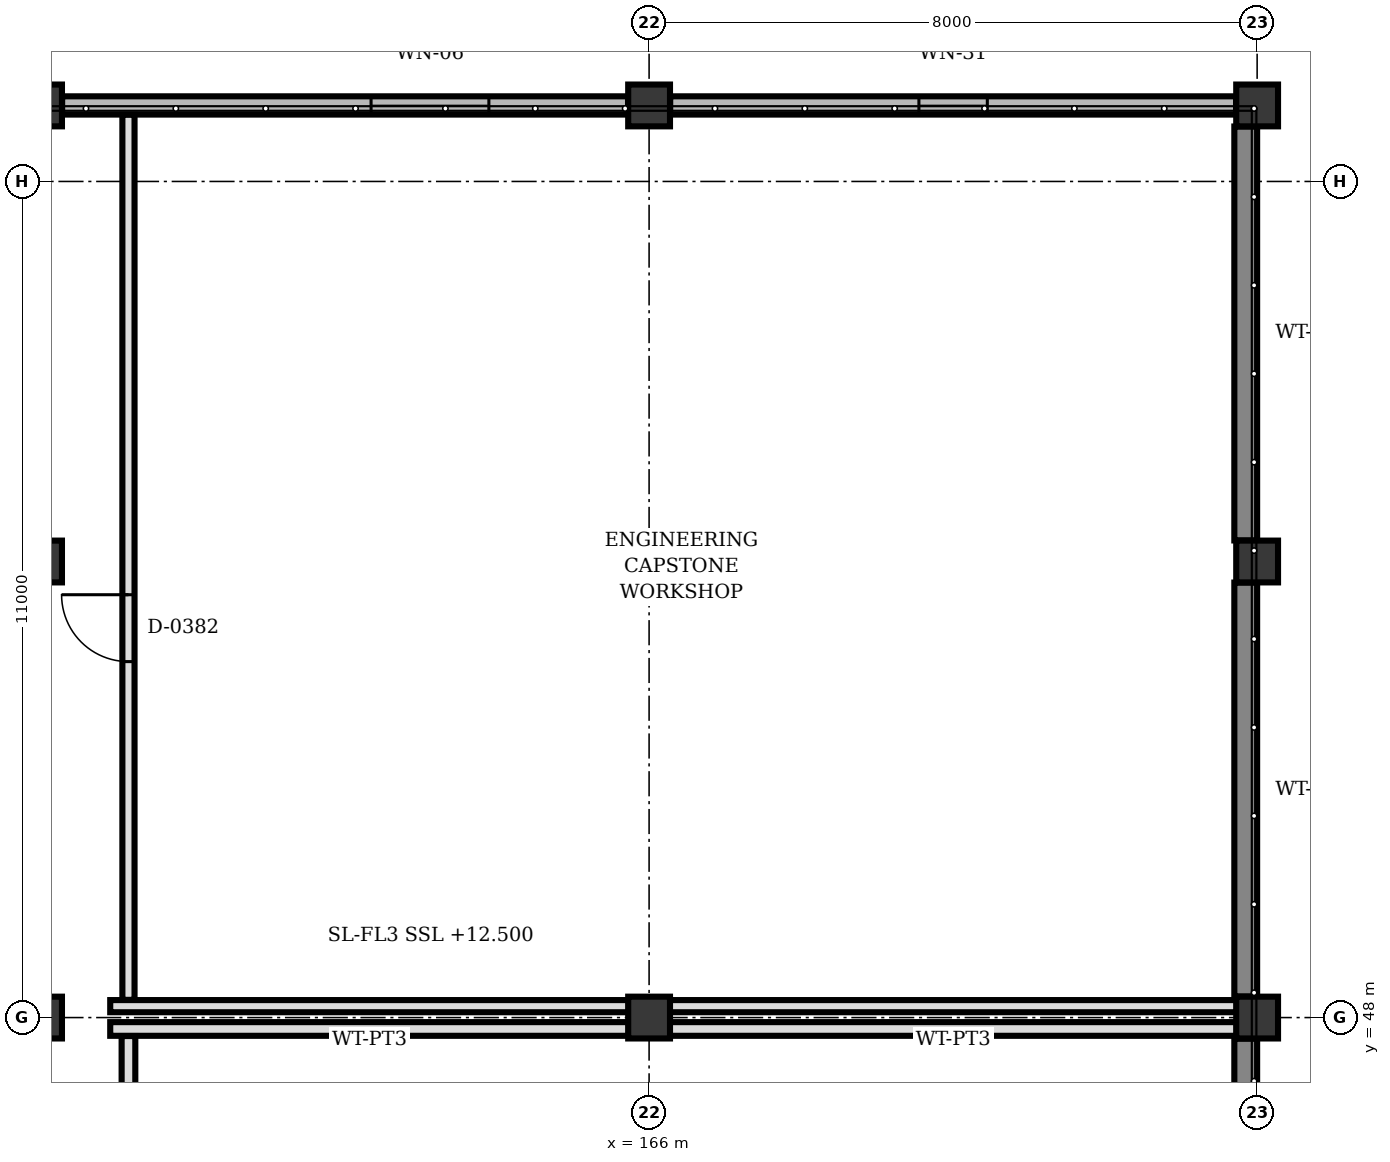
"""IFC4 building model, lengths in metres.
Left out: names, types, materials, properties, quantities, classifications, styles, units other than length and angle.
Written with IfcOpenShell. Run it as: python <this file> out.ifc"""

import sys

from ifc_helpers import new_model, si_unit, direction, frame, frame_2d, origin, origin_2d, place, context, subcontext, project, spatial, rectangle, extrude, element, fill, save


model = new_model("IFC4")
c1 = context("Model", 3, precision=1e-05, world=origin(), true_north=direction((0.0, 1.0)))
c2 = subcontext(c1, "Body", "Model", "MODEL_VIEW")
j1 = project(units=[si_unit("LENGTHUNIT", "METRE"), si_unit("PLANEANGLEUNIT", "RADIAN")], contexts=[c1])
p1 = place(None, origin())
s1 = spatial("IfcSite", under=j1, at=p1, CompositionType="ELEMENT")
p2 = place(p1, origin())
s2 = spatial("IfcBuilding", under=s1, at=p2, CompositionType="ELEMENT")
p3 = place(p2, frame((0.0, 0.0, 12.5)))
s3 = spatial("IfcBuildingStorey", under=s2, at=p3, CompositionType="ELEMENT", Elevation=12.5)
for number, where, z_axis, x_axis in (
    (1, (158.0, 48.0, 0.0), (0.0, 0.0, 1.0), (1.0, 0.0, 0.0)),
    (2, (158.0, 54.0, 0.0), (0.0, 0.0, 1.0), (1.0, 0.0, 0.0)),
    (3, (158.0, 60.0, 0.0), (0.0, 0.0, 1.0), (1.0, 0.0, 0.0)),
    (4, (166.0, 48.0, 0.0), (0.0, 0.0, 1.0), (1.0, 0.0, 0.0)),
    (5, (166.0, 54.0, 0.0), (0.0, 0.0, 1.0), (1.0, 0.0, 0.0)),
    (6, (166.0, 60.0, 0.0), (0.0, 0.0, 1.0), (1.0, 0.0, 0.0)),
    (7, (174.0, 48.0, 0.0), (0.0, 0.0, 1.0), (1.0, 0.0, 0.0)),
    (8, (174.0, 54.0, 0.0), (0.0, 0.0, 1.0), (1.0, 0.0, 0.0)),
    (9, (174.0, 60.0, 0.0), (0.0, 0.0, 1.0), (1.0, 0.0, 0.0)),
):
    element("IfcColumn", number, at=place(p3, frame(where, z_axis=z_axis, x_axis=x_axis)), inside=s3, PredefinedType="COLUMN", context=c2, shape_type="SweptSolid", body=[
        extrude(rectangle(XDim=0.55, YDim=0.55, at=origin_2d()), origin(), (0.0, 0.0, 1.0), 4.0),
    ])
p4 = place(p3, frame((158.277, 60.0, 0.0), z_axis=(0.0, 0.0, 1.0), x_axis=(1.0, 0.0, 0.0)))
e10 = element("IfcWall", 10, at=p4, inside=s3, PredefinedType="SOLIDWALL", context=c2, shape_type="SweptSolid", body=[
    extrude(rectangle(XDim=7.446, YDim=0.24, at=frame_2d((3.723, 0.0))), origin(), (0.0, 0.0, 1.0), 3.289),
])
p5 = place(p4, frame((4.065, 0.0, 0.9)))
e11 = element("IfcOpeningElement", 11, at=p5, cuts=e10, PredefinedType="OPENING", context=c2, shape_type="SweptSolid", body=[
    extrude(rectangle(XDim=1.55, YDim=1.1, at=frame_2d((0.775, 0.55))), frame((0.0, 0.13, 0.0), z_axis=(0.0, -1.0, 0.0), x_axis=(1.0, 0.0, 0.0)), (0.0, 0.0, 1.0), 0.26),
])
p6 = place(p3, frame((166.277, 60.0, 0.0), z_axis=(0.0, 0.0, 1.0), x_axis=(1.0, 0.0, 0.0)))
e12 = element("IfcWall", 12, at=p6, inside=s3, PredefinedType="SOLIDWALL", context=c2, shape_type="SweptSolid", body=[
    extrude(rectangle(XDim=7.446, YDim=0.24, at=frame_2d((3.723, 0.0))), origin(), (0.0, 0.0, 1.0), 3.289),
])
p7 = place(p6, frame((3.273, 0.0, 0.9)))
e13 = element("IfcOpeningElement", 13, at=p7, cuts=e12, PredefinedType="OPENING", context=c2, shape_type="SweptSolid", body=[
    extrude(rectangle(XDim=0.9, YDim=1.55, at=frame_2d((0.45, 0.775))), frame((0.0, 0.13, 0.0), z_axis=(0.0, -1.0, 0.0), x_axis=(1.0, 0.0, 0.0)), (0.0, 0.0, 1.0), 0.26),
])
p8 = place(p3, frame((173.85, 59.723, 0.0), z_axis=(0.0, 0.0, 1.0), x_axis=(0.0, -1.0, 0.0)))
e14 = element("IfcWall", 14, at=p8, inside=s3, PredefinedType="SHEAR", context=c2, shape_type="SweptSolid", body=[
    extrude(rectangle(XDim=5.446, YDim=0.3, at=frame_2d((2.723, 0.0))), origin(), (0.0, 0.0, 1.0), 3.494),
])
p9 = place(p3, frame((173.85, 53.723, 0.0), z_axis=(0.0, 0.0, 1.0), x_axis=(0.0, -1.0, 0.0)))
e15 = element("IfcWall", 15, at=p9, inside=s3, PredefinedType="SHEAR", context=c2, shape_type="SweptSolid", body=[
    extrude(rectangle(XDim=5.446, YDim=0.3, at=frame_2d((2.723, 0.0))), origin(), (0.0, 0.0, 1.0), 3.442),
])
p10 = place(p3, frame((173.85, 47.723, 0.0), z_axis=(0.0, 0.0, 1.0), x_axis=(0.0, -1.0, 0.0)))
e16 = element("IfcWall", 16, at=p10, inside=s3, PredefinedType="SHEAR", context=c2, shape_type="SweptSolid", body=[
    extrude(rectangle(XDim=7.446, YDim=0.3, at=frame_2d((3.723, 0.0))), origin(), (0.0, 0.0, 1.0), 3.494),
])
p11 = place(p3, frame((158.91, 47.85, 0.0), z_axis=(0.0, 0.0, 1.0), x_axis=(1.0, 0.0, 0.0)))
e17 = element("IfcWall", 17, at=p11, inside=s3, PredefinedType="PARTITIONING", context=c2, shape_type="SweptSolid", body=[
    extrude(rectangle(XDim=6.823, YDim=0.18, at=frame_2d((3.412, 0.0))), origin(), (0.0, 0.0, 1.0), 3.289),
])
p12 = place(p3, frame((166.267, 47.85, 0.0), z_axis=(0.0, 0.0, 1.0), x_axis=(1.0, 0.0, 0.0)))
e18 = element("IfcWall", 18, at=p12, inside=s3, PredefinedType="PARTITIONING", context=c2, shape_type="SweptSolid", body=[
    extrude(rectangle(XDim=7.466, YDim=0.18, at=frame_2d((3.733, 0.0))), origin(), (0.0, 0.0, 1.0), 3.289),
])
p13 = place(p3, frame((159.15, 32.123, 0.0), z_axis=(0.0, 0.0, 1.0), x_axis=(0.0, 1.0, 0.0)))
e19 = element("IfcWall", 19, at=p13, inside=s3, PredefinedType="PARTITIONING", context=c2, shape_type="SweptSolid", body=[
    extrude(rectangle(XDim=15.634, YDim=0.18, at=frame_2d((7.817, 0.0))), origin(), (0.0, 0.0, 1.0), 3.289),
])
p14 = place(p13, frame((6.126, 0.0, 0.0)))
e20 = element("IfcOpeningElement", 20, at=p14, cuts=e19, PredefinedType="OPENING", context=c2, shape_type="SweptSolid", body=[
    extrude(rectangle(XDim=0.88, YDim=2.1, at=frame_2d((0.44, 1.05))), frame((0.0, 0.1, 0.0), z_axis=(0.0, -1.0, 0.0), x_axis=(1.0, 0.0, 0.0)), (0.0, 0.0, 1.0), 0.2),
])
p15 = place(p3, frame((173.733, 48.15, 0.0), z_axis=(0.0, 0.0, 1.0), x_axis=(-1.0, 0.0, 0.0)))
e21 = element("IfcWall", 21, at=p15, inside=s3, PredefinedType="PARTITIONING", context=c2, shape_type="SweptSolid", body=[
    extrude(rectangle(XDim=7.466, YDim=0.16, at=frame_2d((3.733, 0.0))), origin(), (0.0, 0.0, 1.0), 3.289),
])
p16 = place(p3, frame((165.733, 48.15, 0.0), z_axis=(0.0, 0.0, 1.0), x_axis=(-1.0, 0.0, 0.0)))
e22 = element("IfcWall", 22, at=p16, inside=s3, PredefinedType="PARTITIONING", context=c2, shape_type="SweptSolid", body=[
    extrude(rectangle(XDim=6.823, YDim=0.16, at=frame_2d((3.412, 0.0))), origin(), (0.0, 0.0, 1.0), 3.289),
])
p17 = place(p3, frame((159.15, 48.233, 0.0), z_axis=(0.0, 0.0, 1.0), x_axis=(0.0, 1.0, 0.0)))
e23 = element("IfcWall", 23, at=p17, inside=s3, PredefinedType="PARTITIONING", context=c2, shape_type="SweptSolid", body=[
    extrude(rectangle(XDim=11.644, YDim=0.16, at=frame_2d((5.822, 0.0))), origin(), (0.0, 0.0, 1.0), 3.289),
])
p18 = place(p17, frame((4.45, 0.0, 0.0)))
e24 = element("IfcOpeningElement", 24, at=p18, cuts=e23, PredefinedType="OPENING", context=c2, shape_type="SweptSolid", body=[
    extrude(rectangle(XDim=0.88, YDim=2.1, at=frame_2d((0.44, 1.05))), frame((0.0, 0.09, 0.0), z_axis=(0.0, -1.0, 0.0), x_axis=(1.0, 0.0, 0.0)), (0.0, 0.0, 1.0), 0.18),
])
p19 = place(p5, origin())
e25 = element("IfcWindow", 25, at=p19, inside=s3, PartitioningType="SINGLE_PANEL", PredefinedType="WINDOW", context=c2, shape_type="SweptSolid", body=[
    extrude(rectangle(XDim=1.55, YDim=1.1, at=frame_2d((0.775, 0.55))), frame((0.0, 0.03, 0.0), z_axis=(0.0, -1.0, 0.0), x_axis=(1.0, 0.0, 0.0)), (0.0, 0.0, 1.0), 0.06),
])
fill(e11, e25)
p20 = place(p7, origin())
e26 = element("IfcWindow", 26, at=p20, inside=s3, PartitioningType="SINGLE_PANEL", PredefinedType="WINDOW", context=c2, shape_type="SweptSolid", body=[
    extrude(rectangle(XDim=0.9, YDim=1.55, at=frame_2d((0.45, 0.775))), frame((0.0, 0.03, 0.0), z_axis=(0.0, -1.0, 0.0), x_axis=(1.0, 0.0, 0.0)), (0.0, 0.0, 1.0), 0.06),
])
fill(e13, e26)
p21 = place(p18, origin())
e27 = element("IfcDoor", 27, at=p21, inside=s3, OperationType="SINGLE_SWING_RIGHT", PredefinedType="DOOR", context=c2, shape_type="SweptSolid", body=[
    extrude(rectangle(XDim=0.88, YDim=2.1, at=frame_2d((0.44, 1.05))), frame((0.0, 0.025, 0.0), z_axis=(0.0, -1.0, 0.0), x_axis=(1.0, 0.0, 0.0)), (0.0, 0.0, 1.0), 0.05),
])
fill(e24, e27)
save(model, sys.argv[1])
